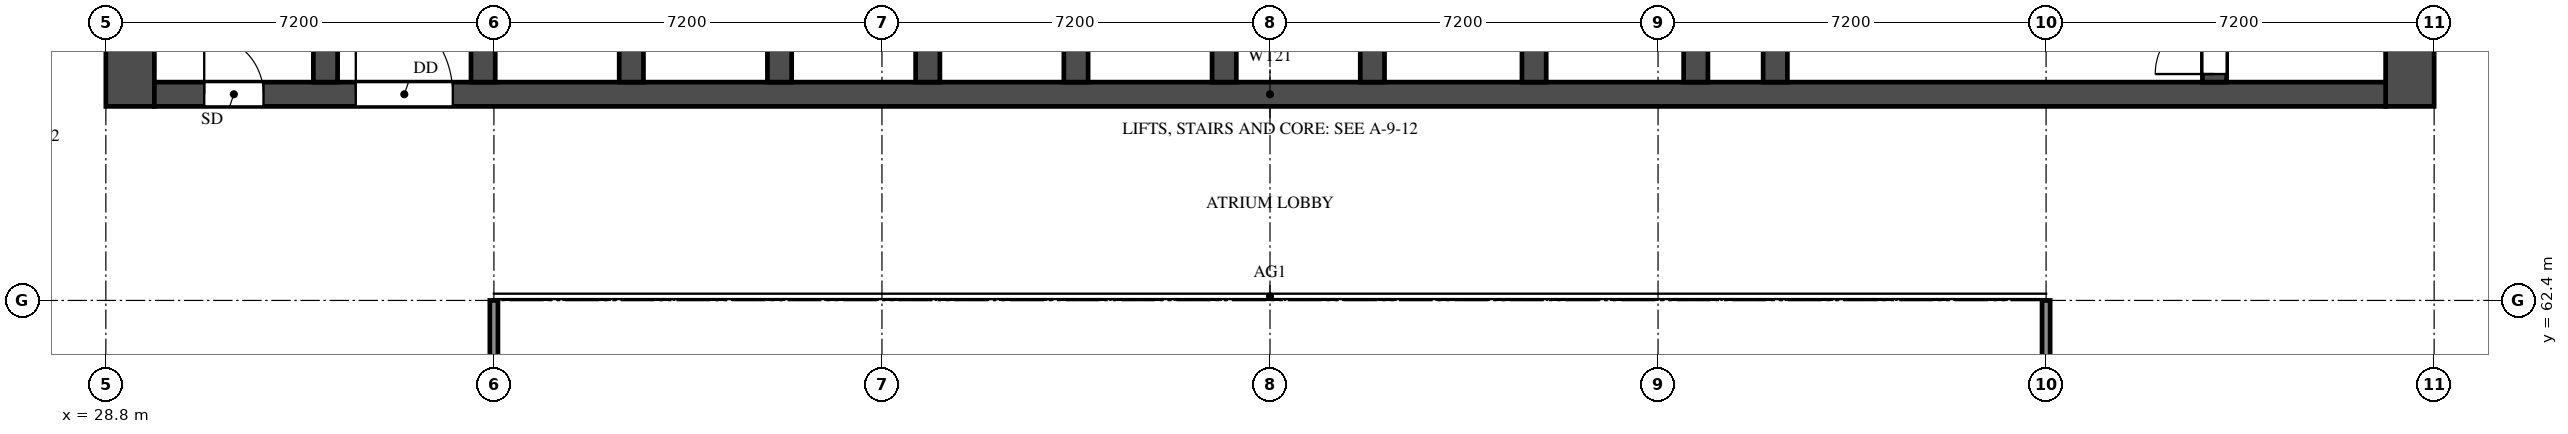
"""IFC4 building model, lengths in metres.
Left out: names, types, materials, properties, quantities, classifications, styles, units other than length and angle.
Written with IfcOpenShell. Run it as: python <this file> out.ifc"""

import sys

from ifc_helpers import new_model, si_unit, direction, frame, frame_2d, origin, place, context, subcontext, project, spatial, rectangle, extrude, element, fill, save


model = new_model("IFC4")
c1 = context("Model", 3, precision=1e-05, world=origin(), true_north=direction((0.0, 1.0)))
c2 = subcontext(c1, "Body", "Model", "MODEL_VIEW")
j1 = project(units=[si_unit("LENGTHUNIT", "METRE"), si_unit("PLANEANGLEUNIT", "RADIAN")], contexts=[c1])
p1 = place(None, origin())
s1 = spatial("IfcSite", under=j1, at=p1, CompositionType="ELEMENT")
p2 = place(p1, origin())
s2 = spatial("IfcBuilding", under=s1, at=p2, CompositionType="ELEMENT")
p3 = place(p2, frame((0.0, 0.0, 76.0)))
s3 = spatial("IfcBuildingStorey", under=s2, at=p3, CompositionType="ELEMENT", Elevation=76.0)
for number, where, z_axis, x_axis in (
    (1, (29.25, 66.0, 0.0), (0.0, 0.0, 1.0), (0.0, 1.0, 0.0)),
    (2, (71.55, 66.0, 0.0), (0.0, 0.0, 1.0), (0.0, 1.0, 0.0)),
):
    element("IfcWall", number, at=place(p3, frame(where, z_axis=z_axis, x_axis=x_axis)), inside=s3, PredefinedType="SHEAR", context=c2, shape_type="SweptSolid", body=[
        extrude(rectangle(XDim=12.0, YDim=0.9, at=frame_2d((6.0, 0.0))), origin(), (0.0, 0.0, 1.0), 3.18),
    ])
p4 = place(p3, frame((29.7, 66.225, 0.0), z_axis=(0.0, 0.0, 1.0), x_axis=(1.0, 0.0, 0.0)))
e3 = element("IfcWall", 3, at=p4, inside=s3, PredefinedType="SHEAR", context=c2, shape_type="SweptSolid", body=[
    extrude(rectangle(XDim=41.4, YDim=0.45, at=frame_2d((20.7, 0.0))), origin(), (0.0, 0.0, 1.0), 3.18),
])
p5 = place(p4, frame((0.925, 0.0, 0.0)))
e4 = element("IfcOpeningElement", 4, at=p5, cuts=e3, PredefinedType="OPENING", context=c2, shape_type="SweptSolid", body=[
    extrude(rectangle(XDim=1.1, YDim=2.1, at=frame_2d((0.55, 1.05))), frame((0.0, 0.235, 0.0), z_axis=(0.0, -1.0, 0.0), x_axis=(1.0, 0.0, 0.0)), (0.0, 0.0, 1.0), 0.47),
])
p6 = place(p4, frame((3.738, 0.0, 0.0)))
e5 = element("IfcOpeningElement", 5, at=p6, cuts=e3, PredefinedType="OPENING", context=c2, shape_type="SweptSolid", body=[
    extrude(rectangle(XDim=1.8, YDim=2.1, at=frame_2d((0.9, 1.05))), frame((0.0, 0.235, 0.0), z_axis=(0.0, -1.0, 0.0), x_axis=(1.0, 0.0, 0.0)), (0.0, 0.0, 1.0), 0.47),
])
p7 = place(p3, frame((32.875, 66.45, 0.0), z_axis=(0.0, 0.0, 1.0), x_axis=(0.0, 1.0, 0.0)))
e6 = element("IfcWall", 6, at=p7, inside=s3, PredefinedType="SHEAR", context=c2, shape_type="SweptSolid", body=[
    extrude(rectangle(XDim=10.65, YDim=0.45, at=frame_2d((5.325, 0.0))), origin(), (0.0, 0.0, 1.0), 3.18),
])
p8 = place(p3, frame((67.925, 66.45, 0.0), z_axis=(0.0, 0.0, 1.0), x_axis=(0.0, 1.0, 0.0)))
e7 = element("IfcWall", 7, at=p8, inside=s3, PredefinedType="SHEAR", context=c2, shape_type="SweptSolid", body=[
    extrude(rectangle(XDim=10.65, YDim=0.45, at=frame_2d((5.325, 0.0))), origin(), (0.0, 0.0, 1.0), 3.18),
])
p9 = place(p8, frame((0.15, 0.0, 0.0)))
e8 = element("IfcOpeningElement", 8, at=p9, cuts=e7, PredefinedType="OPENING", context=c2, shape_type="SweptSolid", body=[
    extrude(rectangle(XDim=1.1, YDim=2.1, at=frame_2d((0.55, 1.05))), frame((0.0, 0.235, 0.0), z_axis=(0.0, -1.0, 0.0), x_axis=(1.0, 0.0, 0.0)), (0.0, 0.0, 1.0), 0.47),
])
p10 = place(p3, frame((59.775, 66.45, 0.0), z_axis=(0.0, 0.0, 1.0), x_axis=(0.0, 1.0, 0.0)))
e9 = element("IfcWall", 9, at=p10, inside=s3, PredefinedType="SHEAR", context=c2, shape_type="SweptSolid", body=[
    extrude(rectangle(XDim=6.025, YDim=0.45, at=frame_2d((3.013, 0.0))), origin(), (0.0, 0.0, 1.0), 3.18),
])
p11 = place(p10, frame((3.85, 0.0, 0.0)))
e10 = element("IfcOpeningElement", 10, at=p11, cuts=e9, PredefinedType="OPENING", context=c2, shape_type="SweptSolid", body=[
    extrude(rectangle(XDim=1.2, YDim=2.1, at=frame_2d((0.6, 1.05))), frame((0.0, 0.235, 0.0), z_axis=(0.0, -1.0, 0.0), x_axis=(1.0, 0.0, 0.0)), (0.0, 0.0, 1.0), 0.47),
])
for number, where, z_axis, x_axis in (
    (11, (35.8, 66.45, 0.0), (0.0, 0.0, 1.0), (0.0, 1.0, 0.0)),
    (12, (38.55, 66.45, 0.0), (0.0, 0.0, 1.0), (0.0, 1.0, 0.0)),
    (13, (41.3, 66.45, 0.0), (0.0, 0.0, 1.0), (0.0, 1.0, 0.0)),
    (14, (44.05, 66.45, 0.0), (0.0, 0.0, 1.0), (0.0, 1.0, 0.0)),
    (15, (46.8, 66.45, 0.0), (0.0, 0.0, 1.0), (0.0, 1.0, 0.0)),
    (16, (49.55, 66.45, 0.0), (0.0, 0.0, 1.0), (0.0, 1.0, 0.0)),
    (17, (52.3, 66.45, 0.0), (0.0, 0.0, 1.0), (0.0, 1.0, 0.0)),
    (18, (55.3, 66.45, 0.0), (0.0, 0.0, 1.0), (0.0, 1.0, 0.0)),
    (19, (58.3, 66.45, 0.0), (0.0, 0.0, 1.0), (0.0, 1.0, 0.0)),
):
    element("IfcWall", number, at=place(p3, frame(where, z_axis=z_axis, x_axis=x_axis)), inside=s3, PredefinedType="SHEAR", context=c2, shape_type="SweptSolid", body=[
        extrude(rectangle(XDim=2.425, YDim=0.45, at=frame_2d((1.212, 0.0))), origin(), (0.0, 0.0, 1.0), 3.18),
    ])
for number, where, z_axis, x_axis in (
    (20, (36.0, 48.0, 0.0), (0.0, 0.0, 1.0), (0.0, 1.0, 0.0)),
    (21, (64.8, 48.0, 0.0), (0.0, 0.0, 1.0), (0.0, 1.0, 0.0)),
):
    element("IfcWall", number, at=place(p3, frame(where, z_axis=z_axis, x_axis=x_axis)), inside=s3, PredefinedType="SOLIDWALL", context=c2, shape_type="SweptSolid", body=[
        extrude(rectangle(XDim=14.4, YDim=0.15, at=frame_2d((7.2, 0.0))), origin(), (0.0, 0.0, 1.0), 2.28),
    ])
p12 = place(p5, origin())
e22 = element("IfcDoor", 22, at=p12, inside=s3, OperationType="SINGLE_SWING_LEFT", PredefinedType="DOOR", context=c2, shape_type="SweptSolid", body=[
    extrude(rectangle(XDim=1.1, YDim=2.1, at=frame_2d((0.55, 1.05))), frame((0.0, 0.025, 0.0), z_axis=(0.0, -1.0, 0.0), x_axis=(1.0, 0.0, 0.0)), (0.0, 0.0, 1.0), 0.05),
])
fill(e4, e22)
p13 = place(p9, origin())
e23 = element("IfcDoor", 23, at=p13, inside=s3, OperationType="SINGLE_SWING_LEFT", PredefinedType="DOOR", context=c2, shape_type="SweptSolid", body=[
    extrude(rectangle(XDim=1.1, YDim=2.1, at=frame_2d((0.55, 1.05))), frame((0.0, 0.025, 0.0), z_axis=(0.0, -1.0, 0.0), x_axis=(1.0, 0.0, 0.0)), (0.0, 0.0, 1.0), 0.05),
])
fill(e8, e23)
p14 = place(p6, origin())
e24 = element("IfcDoor", 24, at=p14, inside=s3, OperationType="DOUBLE_DOOR_SINGLE_SWING", PredefinedType="DOOR", context=c2, shape_type="SweptSolid", body=[
    extrude(rectangle(XDim=1.8, YDim=2.1, at=frame_2d((0.9, 1.05))), frame((0.0, 0.025, 0.0), z_axis=(0.0, -1.0, 0.0), x_axis=(1.0, 0.0, 0.0)), (0.0, 0.0, 1.0), 0.05),
])
fill(e5, e24)
save(model, sys.argv[1])
